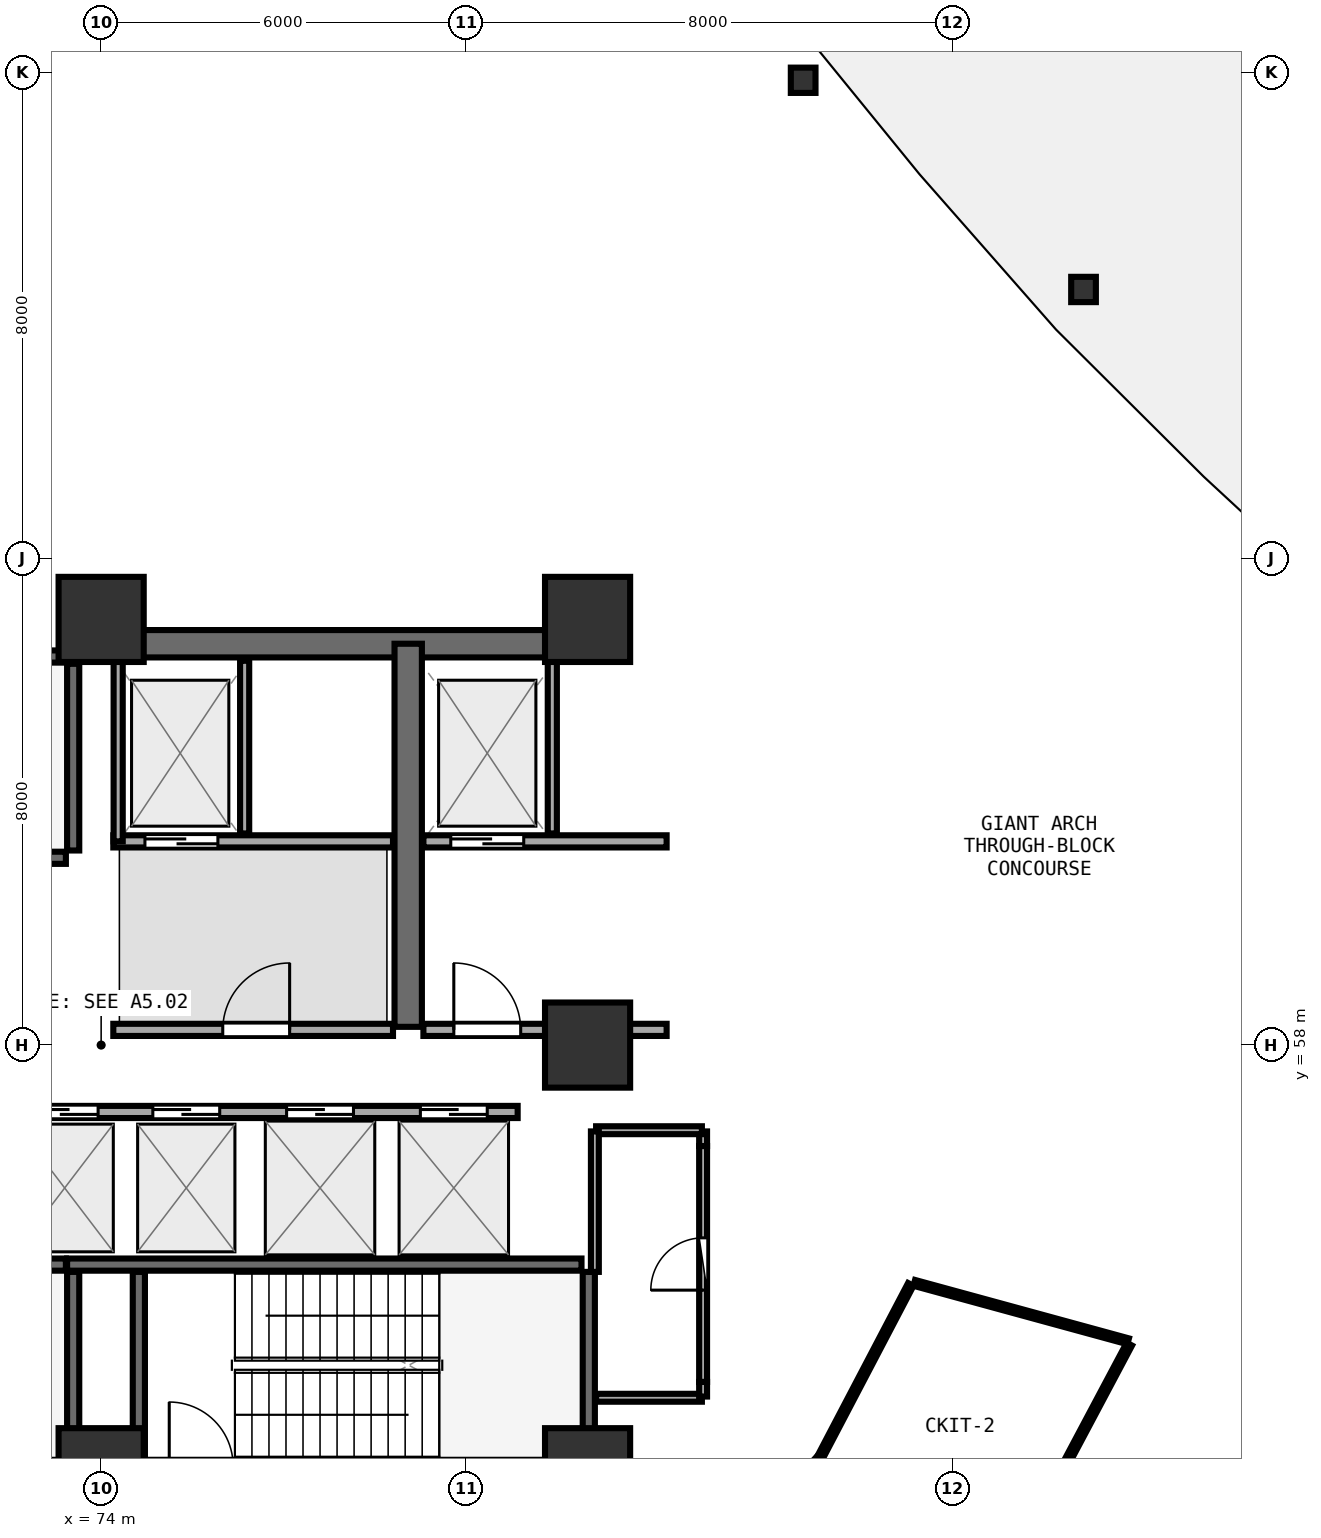
"""IFC4 building model, lengths in metres.
Left out: names, types, materials, properties, quantities, classifications, styles, units other than length and angle.
Written with IfcOpenShell. Run it as: python <this file> out.ifc"""

import sys

from ifc_helpers import new_model, si_unit, direction, frame, frame_2d, origin, origin_2d, place, context, subcontext, project, spatial, rectangle, i_section, extrude, element, fill, save


model = new_model("IFC4")
c1 = context("Model", 3, precision=1e-05, world=origin(), true_north=direction((0.0, 1.0)))
c2 = subcontext(c1, "Body", "Model", "MODEL_VIEW")
j1 = project(units=[si_unit("LENGTHUNIT", "METRE"), si_unit("PLANEANGLEUNIT", "RADIAN")], contexts=[c1])
p1 = place(None, origin())
s1 = spatial("IfcSite", under=j1, at=p1, CompositionType="ELEMENT")
p2 = place(p1, origin())
s2 = spatial("IfcBuilding", under=s1, at=p2, CompositionType="ELEMENT")
p3 = place(p2, origin())
s3 = spatial("IfcBuildingStorey", under=s2, at=p3, CompositionType="ELEMENT", Elevation=0.0)
for number, where, z_axis, x_axis in (
    (1, (74.0, 51.0, 0.0), (0.0, 0.0, 1.0), (1.0, 0.0, 0.0)),
    (2, (82.0, 51.0, 0.0), (0.0, 0.0, 1.0), (1.0, 0.0, 0.0)),
    (3, (82.0, 58.0, 0.0), (0.0, 0.0, 1.0), (1.0, 0.0, 0.0)),
    (4, (82.0, 65.0, 0.0), (0.0, 0.0, 1.0), (1.0, 0.0, 0.0)),
    (5, (74.0, 65.0, 0.0), (0.0, 0.0, 1.0), (1.0, 0.0, 0.0)),
):
    element("IfcColumn", number, at=place(p3, frame(where, z_axis=z_axis, x_axis=x_axis)), inside=s3, PredefinedType="PILASTER", context=c2, shape_type="SweptSolid", body=[
        extrude(rectangle(XDim=1.4, YDim=1.4, at=origin_2d()), origin(), (0.0, 0.0, 1.0), 4.5),
    ])
for number, where, z_axis, x_axis in (
    (6, (90.156, 70.426, 0.0), (0.0, 0.0, 1.0), (1.0, 0.0, 0.0)),
    (7, (85.546, 73.866, 0.0), (0.0, 0.0, 1.0), (1.0, 0.0, 0.0)),
):
    element("IfcColumn", number, at=place(p3, frame(where, z_axis=z_axis, x_axis=x_axis)), inside=s3, PredefinedType="COLUMN", context=c2, shape_type="SweptSolid", body=[
        extrude(i_section(OverallWidth=0.406, OverallDepth=0.416, WebThickness=0.029, FlangeThickness=0.048, FilletRadius=0.015, at=origin_2d()), origin(), (0.0, 0.0, 1.0), 4.5),
    ])
p4 = place(p3, frame((66.26, 61.08, 0.0), z_axis=(0.0, 0.0, 1.0), x_axis=(1.0, 0.0, 0.0)))
e8 = element("IfcWall", 8, at=p4, inside=s3, PredefinedType="SHEAR", context=c2, shape_type="SweptSolid", body=[
    extrude(rectangle(XDim=7.16, YDim=0.2, at=frame_2d((3.58, 0.0))), origin(), (0.0, 0.0, 1.0), 4.2),
])
p5 = place(p3, frame((73.54, 61.2, 0.0), z_axis=(0.0, 0.0, 1.0), x_axis=(0.0, 1.0, 0.0)))
e9 = element("IfcWall", 9, at=p5, inside=s3, PredefinedType="SHEAR", context=c2, shape_type="SweptSolid", body=[
    extrude(rectangle(XDim=3.07, YDim=0.2, at=frame_2d((1.535, 0.0))), origin(), (0.0, 0.0, 1.0), 4.2),
])
p6 = place(p3, frame((73.42, 64.39, 0.0), z_axis=(0.0, 0.0, 1.0), x_axis=(-1.0, 0.0, 0.0)))
e10 = element("IfcWall", 10, at=p6, inside=s3, PredefinedType="SHEAR", context=c2, shape_type="SweptSolid", body=[
    extrude(rectangle(XDim=7.16, YDim=0.2, at=frame_2d((3.58, 0.0))), origin(), (0.0, 0.0, 1.0), 4.2),
])
p7 = place(p3, frame((82.02, 51.2, 0.0), z_axis=(0.0, 0.0, 1.0), x_axis=(0.0, 1.0, 0.0)))
e11 = element("IfcWall", 11, at=p7, inside=s3, PredefinedType="SHEAR", context=c2, shape_type="SweptSolid", body=[
    extrude(rectangle(XDim=3.07, YDim=0.2, at=frame_2d((1.535, 0.0))), origin(), (0.0, 0.0, 1.0), 4.2),
])
p8 = place(p3, frame((81.9, 54.39, 0.0), z_axis=(0.0, 0.0, 1.0), x_axis=(-1.0, 0.0, 0.0)))
e12 = element("IfcWall", 12, at=p8, inside=s3, PredefinedType="SHEAR", context=c2, shape_type="SweptSolid", body=[
    extrude(rectangle(XDim=8.46, YDim=0.2, at=frame_2d((4.23, 0.0))), origin(), (0.0, 0.0, 1.0), 4.2),
])
for number, where, z_axis, x_axis in (
    (13, (74.62, 54.27, 0.0), (0.0, 0.0, 1.0), (0.0, -1.0, 0.0)),
    (14, (73.54, 51.2, 0.0), (0.0, 0.0, 1.0), (0.0, 1.0, 0.0)),
):
    element("IfcWall", number, at=place(p3, frame(where, z_axis=z_axis, x_axis=x_axis)), inside=s3, PredefinedType="SHEAR", context=c2, shape_type="SweptSolid", body=[
        extrude(rectangle(XDim=3.07, YDim=0.2, at=frame_2d((1.535, 0.0))), origin(), (0.0, 0.0, 1.0), 4.2),
    ])
p9 = place(p3, frame((73.42, 54.39, 0.0), z_axis=(0.0, 0.0, 1.0), x_axis=(-1.0, 0.0, 0.0)))
e15 = element("IfcWall", 15, at=p9, inside=s3, PredefinedType="SHEAR", context=c2, shape_type="SweptSolid", body=[
    extrude(rectangle(XDim=7.16, YDim=0.2, at=frame_2d((3.58, 0.0))), origin(), (0.0, 0.0, 1.0), 4.2),
])
p10 = place(p3, frame((74.0, 64.6, 0.0), z_axis=(0.0, 0.0, 1.0), x_axis=(1.0, 0.0, 0.0)))
e16 = element("IfcWall", 16, at=p10, inside=s3, PredefinedType="SHEAR", context=c2, shape_type="SweptSolid", body=[
    extrude(rectangle(XDim=8.0, YDim=0.45, at=frame_2d((4.0, 0.0))), origin(), (0.0, 0.0, 1.0), 4.2),
])
p11 = place(p3, frame((79.05, 58.3, 0.0), z_axis=(0.0, 0.0, 1.0), x_axis=(0.0, 1.0, 0.0)))
e17 = element("IfcWall", 17, at=p11, inside=s3, PredefinedType="SHEAR", context=c2, shape_type="SweptSolid", body=[
    extrude(rectangle(XDim=6.3, YDim=0.45, at=frame_2d((3.15, 0.0))), origin(), (0.0, 0.0, 1.0), 4.2),
])
p12 = place(p3, frame((74.2, 61.35, 0.0), z_axis=(0.0, 0.0, 1.0), x_axis=(1.0, 0.0, 0.0)))
e18 = element("IfcWall", 18, at=p12, inside=s3, PredefinedType="SOLIDWALL", context=c2, shape_type="SweptSolid", body=[
    extrude(rectangle(XDim=4.6, YDim=0.2, at=frame_2d((2.3, 0.0))), origin(), (0.0, 0.0, 1.0), 4.19),
])
p13 = place(p12, frame((0.52, 0.0, 0.0)))
e19 = element("IfcOpeningElement", 19, at=p13, cuts=e18, PredefinedType="OPENING", context=c2, shape_type="SweptSolid", body=[
    extrude(rectangle(XDim=1.2, YDim=2.15, at=frame_2d((0.6, 1.075))), frame((0.0, 0.11, 0.0), z_axis=(0.0, -1.0, 0.0), x_axis=(1.0, 0.0, 0.0)), (0.0, 0.0, 1.0), 0.22),
])
p14 = place(p3, frame((74.28, 61.35, 0.0), z_axis=(0.0, 0.0, 1.0), x_axis=(0.0, 1.0, 0.0)))
e20 = element("IfcWall", 20, at=p14, inside=s3, PredefinedType="PARTITIONING", context=c2, shape_type="SweptSolid", body=[
    extrude(rectangle(XDim=2.97, YDim=0.15, at=frame_2d((1.485, 0.0))), origin(), (0.0, 0.0, 1.0), 4.19),
])
p15 = place(p3, frame((76.36, 61.48, 0.0), z_axis=(0.0, 0.0, 1.0), x_axis=(0.0, 1.0, 0.0)))
e21 = element("IfcWall", 21, at=p15, inside=s3, PredefinedType="PARTITIONING", context=c2, shape_type="SweptSolid", body=[
    extrude(rectangle(XDim=2.84, YDim=0.15, at=frame_2d((1.42, 0.0))), origin(), (0.0, 0.0, 1.0), 4.19),
])
p16 = place(p3, frame((79.3, 61.35, 0.0), z_axis=(0.0, 0.0, 1.0), x_axis=(1.0, 0.0, 0.0)))
e22 = element("IfcWall", 22, at=p16, inside=s3, PredefinedType="SOLIDWALL", context=c2, shape_type="SweptSolid", body=[
    extrude(rectangle(XDim=4.0, YDim=0.2, at=frame_2d((2.0, 0.0))), origin(), (0.0, 0.0, 1.0), 3.485),
])
p17 = place(p16, frame((0.45, 0.0, 0.0)))
e23 = element("IfcOpeningElement", 23, at=p17, cuts=e22, PredefinedType="OPENING", context=c2, shape_type="SweptSolid", body=[
    extrude(rectangle(XDim=1.2, YDim=2.15, at=frame_2d((0.6, 1.075))), frame((0.0, 0.11, 0.0), z_axis=(0.0, -1.0, 0.0), x_axis=(1.0, 0.0, 0.0)), (0.0, 0.0, 1.0), 0.22),
])
p18 = place(p3, frame((81.42, 61.48, 0.0), z_axis=(0.0, 0.0, 1.0), x_axis=(0.0, 1.0, 0.0)))
e24 = element("IfcWall", 24, at=p18, inside=s3, PredefinedType="PARTITIONING", context=c2, shape_type="SweptSolid", body=[
    extrude(rectangle(XDim=2.84, YDim=0.15, at=frame_2d((1.42, 0.0))), origin(), (0.0, 0.0, 1.0), 4.19),
])
p19 = place(p3, frame((74.2, 58.25, 0.0), z_axis=(0.0, 0.0, 1.0), x_axis=(1.0, 0.0, 0.0)))
e25 = element("IfcWall", 25, at=p19, inside=s3, PredefinedType="SOLIDWALL", context=c2, shape_type="SweptSolid", body=[
    extrude(rectangle(XDim=4.6, YDim=0.2, at=frame_2d((2.3, 0.0))), origin(), (0.0, 0.0, 1.0), 4.19),
])
p20 = place(p19, frame((1.8, 0.0, 0.0)))
e26 = element("IfcOpeningElement", 26, at=p20, cuts=e25, PredefinedType="OPENING", context=c2, shape_type="SweptSolid", body=[
    extrude(rectangle(XDim=1.1, YDim=2.1, at=frame_2d((0.55, 1.05))), frame((0.0, 0.11, 0.0), z_axis=(0.0, -1.0, 0.0), x_axis=(1.0, 0.0, 0.0)), (0.0, 0.0, 1.0), 0.22),
])
p21 = place(p3, frame((79.3, 58.25, 0.0), z_axis=(0.0, 0.0, 1.0), x_axis=(1.0, 0.0, 0.0)))
e27 = element("IfcWall", 27, at=p21, inside=s3, PredefinedType="SOLIDWALL", context=c2, shape_type="SweptSolid", body=[
    extrude(rectangle(XDim=4.0, YDim=0.2, at=frame_2d((2.0, 0.0))), origin(), (0.0, 0.0, 1.0), 3.485),
])
p22 = place(p21, frame((0.5, 0.0, 0.0)))
e28 = element("IfcOpeningElement", 28, at=p22, cuts=e27, PredefinedType="OPENING", context=c2, shape_type="SweptSolid", body=[
    extrude(rectangle(XDim=1.1, YDim=2.1, at=frame_2d((0.55, 1.05))), frame((0.0, 0.11, 0.0), z_axis=(0.0, -1.0, 0.0), x_axis=(1.0, 0.0, 0.0)), (0.0, 0.0, 1.0), 0.22),
])
p23 = place(p3, frame((66.45, 56.9, 0.0), z_axis=(0.0, 0.0, 1.0), x_axis=(1.0, 0.0, 0.0)))
e29 = element("IfcWall", 29, at=p23, inside=s3, PredefinedType="SOLIDWALL", context=c2, shape_type="SweptSolid", body=[
    extrude(rectangle(XDim=14.4, YDim=0.2, at=frame_2d((7.2, 0.0))), origin(), (0.0, 0.0, 1.0), 4.19),
])
p24 = place(p23, frame((0.4, 0.0, 0.0)))
e30 = element("IfcOpeningElement", 30, at=p24, cuts=e29, PredefinedType="OPENING", context=c2, shape_type="SweptSolid", body=[
    extrude(rectangle(XDim=1.1, YDim=2.1, at=frame_2d((0.55, 1.05))), frame((0.0, 0.11, 0.0), z_axis=(0.0, -1.0, 0.0), x_axis=(1.0, 0.0, 0.0)), (0.0, 0.0, 1.0), 0.22),
])
p25 = place(p23, frame((2.4, 0.0, 0.0)))
e31 = element("IfcOpeningElement", 31, at=p25, cuts=e29, PredefinedType="OPENING", context=c2, shape_type="SweptSolid", body=[
    extrude(rectangle(XDim=1.1, YDim=2.1, at=frame_2d((0.55, 1.05))), frame((0.0, 0.11, 0.0), z_axis=(0.0, -1.0, 0.0), x_axis=(1.0, 0.0, 0.0)), (0.0, 0.0, 1.0), 0.22),
])
p26 = place(p23, frame((4.4, 0.0, 0.0)))
e32 = element("IfcOpeningElement", 32, at=p26, cuts=e29, PredefinedType="OPENING", context=c2, shape_type="SweptSolid", body=[
    extrude(rectangle(XDim=1.1, YDim=2.1, at=frame_2d((0.55, 1.05))), frame((0.0, 0.11, 0.0), z_axis=(0.0, -1.0, 0.0), x_axis=(1.0, 0.0, 0.0)), (0.0, 0.0, 1.0), 0.22),
])
p27 = place(p23, frame((6.4, 0.0, 0.0)))
e33 = element("IfcOpeningElement", 33, at=p27, cuts=e29, PredefinedType="OPENING", context=c2, shape_type="SweptSolid", body=[
    extrude(rectangle(XDim=1.1, YDim=2.1, at=frame_2d((0.55, 1.05))), frame((0.0, 0.11, 0.0), z_axis=(0.0, -1.0, 0.0), x_axis=(1.0, 0.0, 0.0)), (0.0, 0.0, 1.0), 0.22),
])
p28 = place(p23, frame((8.4, 0.0, 0.0)))
e34 = element("IfcOpeningElement", 34, at=p28, cuts=e29, PredefinedType="OPENING", context=c2, shape_type="SweptSolid", body=[
    extrude(rectangle(XDim=1.1, YDim=2.1, at=frame_2d((0.55, 1.05))), frame((0.0, 0.11, 0.0), z_axis=(0.0, -1.0, 0.0), x_axis=(1.0, 0.0, 0.0)), (0.0, 0.0, 1.0), 0.22),
])
p29 = place(p23, frame((10.6, 0.0, 0.0)))
e35 = element("IfcOpeningElement", 35, at=p29, cuts=e29, PredefinedType="OPENING", context=c2, shape_type="SweptSolid", body=[
    extrude(rectangle(XDim=1.1, YDim=2.1, at=frame_2d((0.55, 1.05))), frame((0.0, 0.11, 0.0), z_axis=(0.0, -1.0, 0.0), x_axis=(1.0, 0.0, 0.0)), (0.0, 0.0, 1.0), 0.22),
])
p30 = place(p23, frame((12.8, 0.0, 0.0)))
e36 = element("IfcOpeningElement", 36, at=p30, cuts=e29, PredefinedType="OPENING", context=c2, shape_type="SweptSolid", body=[
    extrude(rectangle(XDim=1.1, YDim=2.1, at=frame_2d((0.55, 1.05))), frame((0.0, 0.11, 0.0), z_axis=(0.0, -1.0, 0.0), x_axis=(1.0, 0.0, 0.0)), (0.0, 0.0, 1.0), 0.22),
])
p31 = place(p3, frame((83.9, 52.46, 0.0), z_axis=(0.0, 0.0, 1.0), x_axis=(0.0, 1.0, 0.0)))
e37 = element("IfcWall", 37, at=p31, inside=s3, PredefinedType="PLUMBINGWALL", context=c2, shape_type="SweptSolid", body=[
    extrude(rectangle(XDim=3.88, YDim=0.13, at=frame_2d((1.94, 0.0))), origin(), (0.0, 0.0, 1.0), 4.19),
])
p32 = place(p31, frame((1.51, 0.0, 0.0)))
e38 = element("IfcOpeningElement", 38, at=p32, cuts=e37, PredefinedType="OPENING", context=c2, shape_type="SweptSolid", body=[
    extrude(rectangle(XDim=0.86, YDim=2.05, at=frame_2d((0.43, 1.025))), frame((0.0, 0.075, 0.0), z_axis=(0.0, -1.0, 0.0), x_axis=(1.0, 0.0, 0.0)), (0.0, 0.0, 1.0), 0.15),
])
p33 = place(p3, frame((82.14, 52.2, 0.0), z_axis=(0.0, 0.0, 1.0), x_axis=(1.0, 0.0, 0.0)))
e39 = element("IfcWall", 39, at=p33, inside=s3, PredefinedType="PLUMBINGWALL", context=c2, shape_type="SweptSolid", body=[
    extrude(rectangle(XDim=1.74, YDim=0.13, at=frame_2d((0.87, 0.0))), origin(), (0.0, 0.0, 1.0), 3.485),
])
for number, where, z_axis, x_axis in (
    (40, (83.9, 52.22, 0.0), (0.0, 0.0, 1.0), (0.0, 1.0, 0.0)),
    (41, (83.9, 56.34, 0.0), (0.0, 0.0, 1.0), (0.0, 1.0, 0.0)),
):
    element("IfcWall", number, at=place(p3, frame(where, z_axis=z_axis, x_axis=x_axis)), inside=s3, PredefinedType="PLUMBINGWALL", context=c2, shape_type="SweptSolid", body=[
        extrude(rectangle(XDim=0.24, YDim=0.13, at=frame_2d((0.12, 0.0))), origin(), (0.0, 0.0, 1.0), 4.19),
    ])
p34 = place(p3, frame((83.88, 56.6, 0.0), z_axis=(0.0, 0.0, 1.0), x_axis=(-1.0, 0.0, 0.0)))
e42 = element("IfcWall", 42, at=p34, inside=s3, PredefinedType="PLUMBINGWALL", context=c2, shape_type="SweptSolid", body=[
    extrude(rectangle(XDim=1.74, YDim=0.13, at=frame_2d((0.87, 0.0))), origin(), (0.0, 0.0, 1.0), 3.485),
])
p35 = place(p3, frame((82.12, 56.58, 0.0), z_axis=(0.0, 0.0, 1.0), x_axis=(0.0, -1.0, 0.0)))
e43 = element("IfcWall", 43, at=p35, inside=s3, PredefinedType="PLUMBINGWALL", context=c2, shape_type="SweptSolid", body=[
    extrude(rectangle(XDim=2.31, YDim=0.13, at=frame_2d((1.155, 0.0))), origin(), (0.0, 0.0, 1.0), 3.485),
])
p36 = place(p3, frame((83.589, 48.799, 0.0), z_axis=(0.0, 0.0, 1.0), x_axis=(0.678488862619, 0.734610688257, 0.0)))
e44 = element("IfcWall", 44, at=p36, inside=s3, PredefinedType="PARTITIONING", context=c2, shape_type="SweptSolid", body=[
    extrude(rectangle(XDim=3.254, YDim=0.1, at=frame_2d((1.627, 0.0))), origin(), (0.0, 0.0, 1.0), 3.585),
])
p37 = place(p3, frame((85.843, 51.254, 0.0), z_axis=(0.0, 0.0, 1.0), x_axis=(0.464213996316, 0.885723075021, 0.0)))
e45 = element("IfcWall", 45, at=p37, inside=s3, PredefinedType="PARTITIONING", context=c2, shape_type="SweptSolid", body=[
    extrude(rectangle(XDim=3.173, YDim=0.1, at=frame_2d((1.586, 0.0))), origin(), (0.0, 0.0, 1.0), 4.19),
])
p38 = place(p3, frame((87.373, 54.09, 0.0), z_axis=(0.0, 0.0, 1.0), x_axis=(0.964640120238, -0.263570556831, 0.0)))
e46 = element("IfcWall", 46, at=p38, inside=s3, PredefinedType="PARTITIONING", context=c2, shape_type="SweptSolid", body=[
    extrude(rectangle(XDim=3.647, YDim=0.1, at=frame_2d((1.823, 0.0))), origin(), (0.0, 0.0, 1.0), 3.945),
])
p39 = place(p3, frame((90.91, 53.083, 0.0), z_axis=(0.0, 0.0, 1.0), x_axis=(-0.469290424741, -0.883043881835, 0.0)))
e47 = element("IfcWall", 47, at=p39, inside=s3, PredefinedType="PARTITIONING", context=c2, shape_type="SweptSolid", body=[
    extrude(rectangle(XDim=4.005, YDim=0.1, at=frame_2d((2.002, 0.0))), origin(), (0.0, 0.0, 1.0), 3.585),
])
p40 = place(p13, origin())
e48 = element("IfcDoor", 48, at=p40, inside=s3, OperationType="DOUBLE_DOOR_SLIDING", PredefinedType="DOOR", context=c2, shape_type="SweptSolid", body=[
    extrude(rectangle(XDim=1.2, YDim=2.15, at=frame_2d((0.6, 1.075))), frame((0.0, 0.025, 0.0), z_axis=(0.0, -1.0, 0.0), x_axis=(1.0, 0.0, 0.0)), (0.0, 0.0, 1.0), 0.05),
])
fill(e19, e48)
p41 = place(p17, origin())
e49 = element("IfcDoor", 49, at=p41, inside=s3, OperationType="DOUBLE_DOOR_SLIDING", PredefinedType="DOOR", context=c2, shape_type="SweptSolid", body=[
    extrude(rectangle(XDim=1.2, YDim=2.15, at=frame_2d((0.6, 1.075))), frame((0.0, 0.025, 0.0), z_axis=(0.0, -1.0, 0.0), x_axis=(1.0, 0.0, 0.0)), (0.0, 0.0, 1.0), 0.05),
])
fill(e23, e49)
p42 = place(p20, frame((1.1, 0.0, 0.0), z_axis=(0.0, 0.0, 1.0), x_axis=(-1.0, 0.0, 0.0)))
e50 = element("IfcDoor", 50, at=p42, inside=s3, OperationType="SINGLE_SWING_LEFT", PredefinedType="DOOR", context=c2, shape_type="SweptSolid", body=[
    extrude(rectangle(XDim=1.1, YDim=2.1, at=frame_2d((0.55, 1.05))), frame((0.0, 0.025, 0.0), z_axis=(0.0, -1.0, 0.0), x_axis=(1.0, 0.0, 0.0)), (0.0, 0.0, 1.0), 0.05),
])
fill(e26, e50)
p43 = place(p22, frame((1.1, 0.0, 0.0), z_axis=(0.0, 0.0, 1.0), x_axis=(-1.0, 0.0, 0.0)))
e51 = element("IfcDoor", 51, at=p43, inside=s3, OperationType="SINGLE_SWING_RIGHT", PredefinedType="DOOR", context=c2, shape_type="SweptSolid", body=[
    extrude(rectangle(XDim=1.1, YDim=2.1, at=frame_2d((0.55, 1.05))), frame((0.0, 0.025, 0.0), z_axis=(0.0, -1.0, 0.0), x_axis=(1.0, 0.0, 0.0)), (0.0, 0.0, 1.0), 0.05),
])
fill(e28, e51)
p44 = place(p27, origin())
e52 = element("IfcDoor", 52, at=p44, inside=s3, OperationType="DOUBLE_DOOR_SLIDING", PredefinedType="DOOR", context=c2, shape_type="SweptSolid", body=[
    extrude(rectangle(XDim=1.1, YDim=2.1, at=frame_2d((0.55, 1.05))), frame((0.0, 0.025, 0.0), z_axis=(0.0, -1.0, 0.0), x_axis=(1.0, 0.0, 0.0)), (0.0, 0.0, 1.0), 0.05),
])
fill(e33, e52)
p45 = place(p28, origin())
e53 = element("IfcDoor", 53, at=p45, inside=s3, OperationType="DOUBLE_DOOR_SLIDING", PredefinedType="DOOR", context=c2, shape_type="SweptSolid", body=[
    extrude(rectangle(XDim=1.1, YDim=2.1, at=frame_2d((0.55, 1.05))), frame((0.0, 0.025, 0.0), z_axis=(0.0, -1.0, 0.0), x_axis=(1.0, 0.0, 0.0)), (0.0, 0.0, 1.0), 0.05),
])
fill(e34, e53)
p46 = place(p29, origin())
e54 = element("IfcDoor", 54, at=p46, inside=s3, OperationType="DOUBLE_DOOR_SLIDING", PredefinedType="DOOR", context=c2, shape_type="SweptSolid", body=[
    extrude(rectangle(XDim=1.1, YDim=2.1, at=frame_2d((0.55, 1.05))), frame((0.0, 0.025, 0.0), z_axis=(0.0, -1.0, 0.0), x_axis=(1.0, 0.0, 0.0)), (0.0, 0.0, 1.0), 0.05),
])
fill(e35, e54)
p47 = place(p30, origin())
e55 = element("IfcDoor", 55, at=p47, inside=s3, OperationType="DOUBLE_DOOR_SLIDING", PredefinedType="DOOR", context=c2, shape_type="SweptSolid", body=[
    extrude(rectangle(XDim=1.1, YDim=2.1, at=frame_2d((0.55, 1.05))), frame((0.0, 0.025, 0.0), z_axis=(0.0, -1.0, 0.0), x_axis=(1.0, 0.0, 0.0)), (0.0, 0.0, 1.0), 0.05),
])
fill(e36, e55)
p48 = place(p32, origin())
e56 = element("IfcDoor", 56, at=p48, inside=s3, OperationType="SINGLE_SWING_LEFT", PredefinedType="DOOR", context=c2, shape_type="SweptSolid", body=[
    extrude(rectangle(XDim=0.86, YDim=2.05, at=frame_2d((0.43, 1.025))), frame((0.0, 0.025, 0.0), z_axis=(0.0, -1.0, 0.0), x_axis=(1.0, 0.0, 0.0)), (0.0, 0.0, 1.0), 0.05),
])
fill(e38, e56)
save(model, sys.argv[1])
